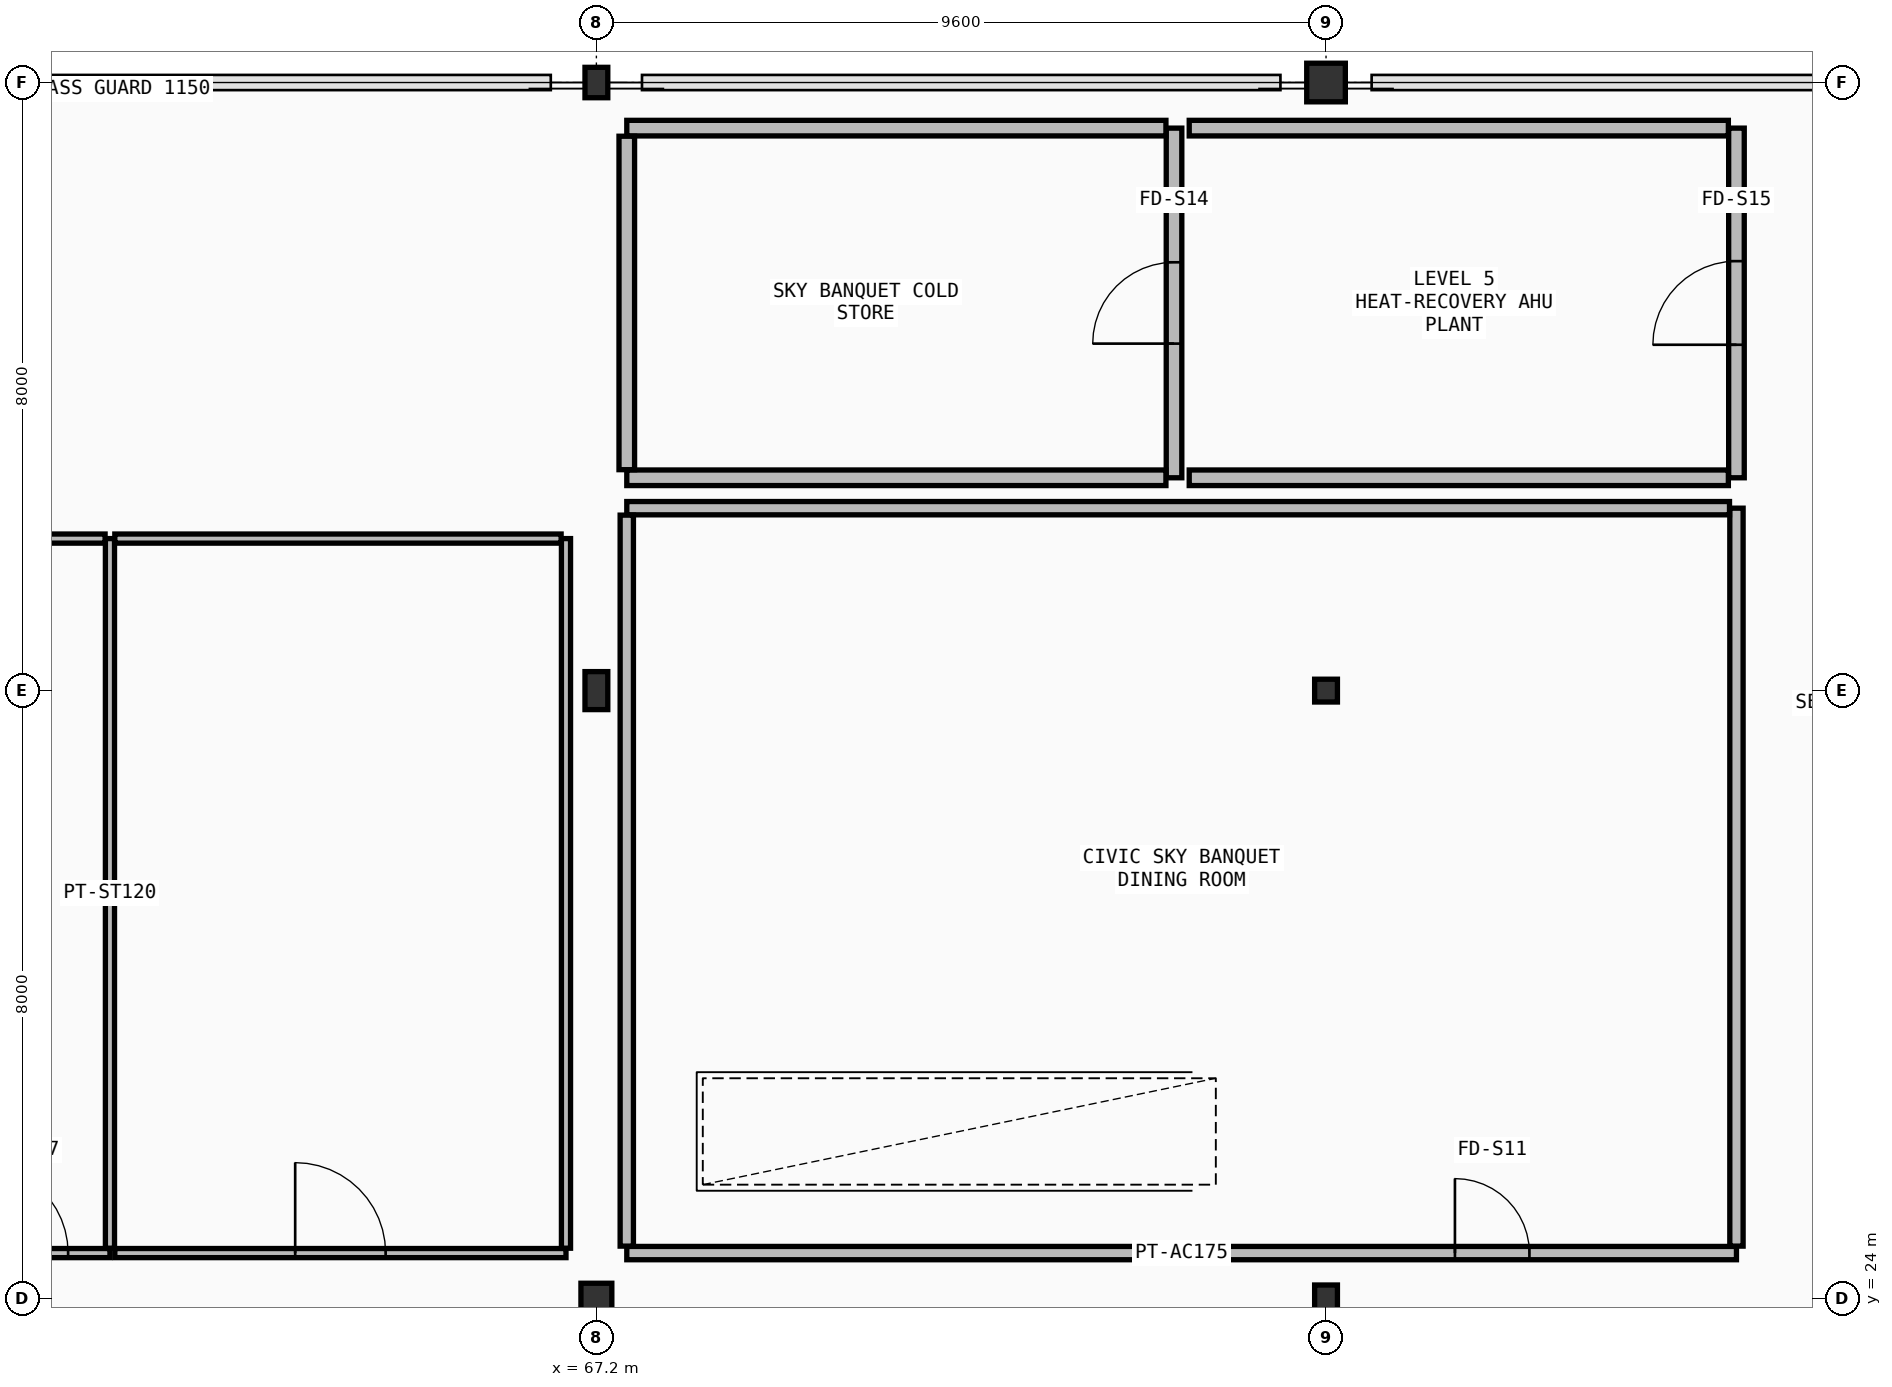
"""IFC4 building model, lengths in metres.
Left out: names, types, materials, properties, quantities, classifications, styles, units other than length and angle.
Written with IfcOpenShell. Run it as: python <this file> out.ifc"""

import sys

from ifc_helpers import new_model, si_unit, direction, frame, frame_2d, origin, origin_2d, place, context, subcontext, project, spatial, rectangle, hollow_circle, i_section, extrude, element, fill, save


model = new_model("IFC4")
c1 = context("Model", 3, precision=1e-05, world=origin(), true_north=direction((0.0, 1.0)))
c2 = subcontext(c1, "Body", "Model", "MODEL_VIEW")
j1 = project(units=[si_unit("LENGTHUNIT", "METRE"), si_unit("PLANEANGLEUNIT", "RADIAN")], contexts=[c1])
p1 = place(None, origin())
s1 = spatial("IfcSite", under=j1, at=p1, CompositionType="ELEMENT")
p2 = place(p1, origin())
s2 = spatial("IfcBuilding", under=s1, at=p2, CompositionType="ELEMENT")
p3 = place(p2, frame((0.0, 0.0, 24.9)))
s3 = spatial("IfcBuildingStorey", under=s2, at=p3, CompositionType="ELEMENT", Elevation=24.9)
p4 = place(p3, frame((67.2, 24.0, 0.0), z_axis=(0.0, 0.0, 1.0), x_axis=(1.0, 0.0, 0.0)))
e1 = element("IfcColumn", 1, at=p4, inside=s3, PredefinedType="COLUMN", context=c2, shape_type="SweptSolid", body=[
    extrude(hollow_circle(Radius=0.203, WallThickness=0.02, at=origin_2d()), origin(), (0.0, 0.0, 1.0), 4.5),
])
p5 = place(p3, frame((67.2, 32.0, 0.0), z_axis=(0.0, 0.0, 1.0), x_axis=(1.0, 0.0, 0.0)))
e2 = element("IfcColumn", 2, at=p5, inside=s3, PredefinedType="COLUMN", context=c2, shape_type="SweptSolid", body=[
    extrude(i_section(OverallWidth=0.3, OverallDepth=0.5, WebThickness=0.014, FlangeThickness=0.028, FilletRadius=0.027, at=origin_2d()), origin(), (0.0, 0.0, 1.0), 4.5),
])
p6 = place(p3, frame((67.2, 40.0, 0.0), z_axis=(0.0, 0.0, 1.0), x_axis=(1.0, 0.0, 0.0)))
e3 = element("IfcColumn", 3, at=p6, inside=s3, PredefinedType="COLUMN", context=c2, shape_type="SweptSolid", body=[
    extrude(i_section(OverallWidth=0.3, OverallDepth=0.4, WebThickness=0.013, FlangeThickness=0.024, FilletRadius=0.027, at=origin_2d()), origin(), (0.0, 0.0, 1.0), 4.5),
])
p7 = place(p3, frame((76.8, 24.0, 0.0), z_axis=(0.0, 0.0, 1.0), x_axis=(1.0, 0.0, 0.0)))
e4 = element("IfcColumn", 4, at=p7, inside=s3, PredefinedType="COLUMN", context=c2, shape_type="SweptSolid", body=[
    extrude(i_section(OverallWidth=0.3, OverallDepth=0.36, WebThickness=0.012, FlangeThickness=0.022, FilletRadius=0.027, at=origin_2d()), origin(), (0.0, 0.0, 1.0), 4.5),
])
p8 = place(p3, frame((76.8, 32.0, 0.0), z_axis=(0.0, 0.0, 1.0), x_axis=(1.0, 0.0, 0.0)))
e5 = element("IfcColumn", 5, at=p8, inside=s3, PredefinedType="COLUMN", context=c2, shape_type="SweptSolid", body=[
    extrude(i_section(OverallWidth=0.3, OverallDepth=0.3, WebThickness=0.011, FlangeThickness=0.019, FilletRadius=0.027, at=origin_2d()), origin(), (0.0, 0.0, 1.0), 4.5),
])
p9 = place(p3, frame((76.8, 40.0, 0.0), z_axis=(0.0, 0.0, 1.0), x_axis=(1.0, 0.0, 0.0)))
e6 = element("IfcColumn", 6, at=p9, inside=s3, PredefinedType="COLUMN", context=c2, shape_type="SweptSolid", body=[
    extrude(hollow_circle(Radius=0.254, WallThickness=0.025, at=origin_2d()), origin(), (0.0, 0.0, 1.0), 4.5),
])
p10 = place(p3, frame((67.6, 24.6, 0.0), z_axis=(0.0, 0.0, 1.0), x_axis=(1.0, 0.0, 0.0)))
e7 = element("IfcWall", 7, at=p10, inside=s3, PredefinedType="PARTITIONING", context=c2, shape_type="SweptSolid", body=[
    extrude(rectangle(XDim=14.6, YDim=0.175, at=frame_2d((7.3, 0.0))), origin(), (0.0, 0.0, 1.0), 3.34),
])
p11 = place(p10, frame((10.896, 0.0, 0.0)))
e8 = element("IfcOpeningElement", 8, at=p11, cuts=e7, PredefinedType="OPENING", context=c2, shape_type="SweptSolid", body=[
    extrude(rectangle(XDim=0.98, YDim=2.2, at=frame_2d((0.49, 1.1))), frame((0.0, 0.097, 0.0), z_axis=(0.0, -1.0, 0.0), x_axis=(1.0, 0.0, 0.0)), (0.0, 0.0, 1.0), 0.195),
])
p12 = place(p3, frame((82.2, 24.691, 0.0), z_axis=(0.0, 0.0, 1.0), x_axis=(0.0, 1.0, 0.0)))
e9 = element("IfcWall", 9, at=p12, inside=s3, PredefinedType="PARTITIONING", context=c2, shape_type="SweptSolid", body=[
    extrude(rectangle(XDim=9.708, YDim=0.175, at=frame_2d((4.854, 0.0))), origin(), (0.0, 0.0, 1.0), 3.74),
])
p13 = place(p3, frame((82.108, 34.4, 0.0), z_axis=(0.0, 0.0, 1.0), x_axis=(-1.0, 0.0, 0.0)))
e10 = element("IfcWall", 10, at=p13, inside=s3, PredefinedType="PARTITIONING", context=c2, shape_type="SweptSolid", body=[
    extrude(rectangle(XDim=14.508, YDim=0.175, at=frame_2d((7.254, 0.0))), origin(), (0.0, 0.0, 1.0), 3.53),
])
p14 = place(p3, frame((67.6, 34.309, 0.0), z_axis=(0.0, 0.0, 1.0), x_axis=(0.0, -1.0, 0.0)))
e11 = element("IfcWall", 11, at=p14, inside=s3, PredefinedType="PARTITIONING", context=c2, shape_type="SweptSolid", body=[
    extrude(rectangle(XDim=9.617, YDim=0.175, at=frame_2d((4.809, 0.0))), origin(), (0.0, 0.0, 1.0), 3.64),
])
p15 = place(p3, frame((74.8, 34.8, 0.0), z_axis=(0.0, 0.0, 1.0), x_axis=(0.0, 1.0, 0.0)))
e12 = element("IfcWall", 12, at=p15, inside=s3, PredefinedType="SOLIDWALL", context=c2, shape_type="SweptSolid", body=[
    extrude(rectangle(XDim=4.6, YDim=0.205, at=frame_2d((2.3, 0.0))), origin(), (0.0, 0.0, 1.0), 4.26),
])
p16 = place(p15, frame((1.765, 0.0, 0.0)))
e13 = element("IfcOpeningElement", 13, at=p16, cuts=e12, PredefinedType="OPENING", context=c2, shape_type="SweptSolid", body=[
    extrude(rectangle(XDim=1.07, YDim=2.26, at=frame_2d((0.535, 1.13))), frame((0.0, 0.113, 0.0), z_axis=(0.0, -1.0, 0.0), x_axis=(1.0, 0.0, 0.0)), (0.0, 0.0, 1.0), 0.225),
])
for number, where, z_axis, x_axis in (
    (14, (67.6, 34.8, 0.0), (0.0, 0.0, 1.0), (1.0, 0.0, 0.0)),
    (15, (74.694, 39.4, 0.0), (0.0, 0.0, 1.0), (-1.0, 0.0, 0.0)),
):
    element("IfcWall", number, at=place(p3, frame(where, z_axis=z_axis, x_axis=x_axis)), inside=s3, PredefinedType="SOLIDWALL", context=c2, shape_type="SweptSolid", body=[
        extrude(rectangle(XDim=7.094, YDim=0.205, at=frame_2d((3.547, 0.0))), origin(), (0.0, 0.0, 1.0), 4.26),
    ])
p17 = place(p3, frame((67.6, 39.293, 0.0), z_axis=(0.0, 0.0, 1.0), x_axis=(0.0, -1.0, 0.0)))
e16 = element("IfcWall", 16, at=p17, inside=s3, PredefinedType="SOLIDWALL", context=c2, shape_type="SweptSolid", body=[
    extrude(rectangle(XDim=4.387, YDim=0.205, at=frame_2d((2.193, 0.0))), origin(), (0.0, 0.0, 1.0), 4.26),
])
p18 = place(p3, frame((82.2, 34.8, 0.0), z_axis=(0.0, 0.0, 1.0), x_axis=(0.0, 1.0, 0.0)))
e17 = element("IfcWall", 17, at=p18, inside=s3, PredefinedType="SOLIDWALL", context=c2, shape_type="SweptSolid", body=[
    extrude(rectangle(XDim=4.6, YDim=0.205, at=frame_2d((2.3, 0.0))), origin(), (0.0, 0.0, 1.0), 4.26),
])
p19 = place(p18, frame((1.75, 0.0, 0.0)))
e18 = element("IfcOpeningElement", 18, at=p19, cuts=e17, PredefinedType="OPENING", context=c2, shape_type="SweptSolid", body=[
    extrude(rectangle(XDim=1.1, YDim=2.28, at=frame_2d((0.55, 1.14))), frame((0.0, 0.113, 0.0), z_axis=(0.0, -1.0, 0.0), x_axis=(1.0, 0.0, 0.0)), (0.0, 0.0, 1.0), 0.225),
])
for number, where, z_axis, x_axis in (
    (19, (75.0, 34.8, 0.0), (0.0, 0.0, 1.0), (1.0, 0.0, 0.0)),
    (20, (82.094, 39.4, 0.0), (0.0, 0.0, 1.0), (-1.0, 0.0, 0.0)),
):
    element("IfcWall", number, at=place(p3, frame(where, z_axis=z_axis, x_axis=x_axis)), inside=s3, PredefinedType="SOLIDWALL", context=c2, shape_type="SweptSolid", body=[
        extrude(rectangle(XDim=7.094, YDim=0.205, at=frame_2d((3.547, 0.0))), origin(), (0.0, 0.0, 1.0), 3.53),
    ])
p20 = place(p3, frame((54.546, 24.6, 0.0), z_axis=(0.0, 0.0, 1.0), x_axis=(1.0, 0.0, 0.0)))
e21 = element("IfcWall", 21, at=p20, inside=s3, PredefinedType="PARTITIONING", context=c2, shape_type="SweptSolid", body=[
    extrude(rectangle(XDim=6.254, YDim=0.12, at=frame_2d((3.127, 0.0))), origin(), (0.0, 0.0, 1.0), 3.64),
])
p21 = place(p20, frame((4.543, 0.0, 0.0)))
e22 = element("IfcOpeningElement", 22, at=p21, cuts=e21, PredefinedType="OPENING", context=c2, shape_type="SweptSolid", body=[
    extrude(rectangle(XDim=1.16, YDim=2.32, at=frame_2d((0.58, 1.16))), frame((0.0, 0.07, 0.0), z_axis=(0.0, -1.0, 0.0), x_axis=(1.0, 0.0, 0.0)), (0.0, 0.0, 1.0), 0.14),
])
p22 = place(p3, frame((60.8, 24.664, 0.0), z_axis=(0.0, 0.0, 1.0), x_axis=(0.0, 1.0, 0.0)))
e23 = element("IfcWall", 23, at=p22, inside=s3, PredefinedType="PARTITIONING", context=c2, shape_type="SweptSolid", body=[
    extrude(rectangle(XDim=9.336, YDim=0.12, at=frame_2d((4.668, 0.0))), origin(), (0.0, 0.0, 1.0), 3.78),
])
p23 = place(p3, frame((60.736, 34.0, 0.0), z_axis=(0.0, 0.0, 1.0), x_axis=(-1.0, 0.0, 0.0)))
e24 = element("IfcWall", 24, at=p23, inside=s3, PredefinedType="PARTITIONING", context=c2, shape_type="SweptSolid", body=[
    extrude(rectangle(XDim=6.19, YDim=0.12, at=frame_2d((3.095, 0.0))), origin(), (0.0, 0.0, 1.0), 3.68),
])
p24 = place(p3, frame((60.864, 24.6, 0.0), z_axis=(0.0, 0.0, 1.0), x_axis=(1.0, 0.0, 0.0)))
e25 = element("IfcWall", 25, at=p24, inside=s3, PredefinedType="PARTITIONING", context=c2, shape_type="SweptSolid", body=[
    extrude(rectangle(XDim=5.936, YDim=0.12, at=frame_2d((2.968, 0.0))), origin(), (0.0, 0.0, 1.0), 4.27),
])
p25 = place(p24, frame((2.373, 0.0, 0.0)))
e26 = element("IfcOpeningElement", 26, at=p25, cuts=e25, PredefinedType="OPENING", context=c2, shape_type="SweptSolid", body=[
    extrude(rectangle(XDim=1.19, YDim=2.34, at=frame_2d((0.595, 1.17))), frame((0.0, 0.07, 0.0), z_axis=(0.0, -1.0, 0.0), x_axis=(1.0, 0.0, 0.0)), (0.0, 0.0, 1.0), 0.14),
])
p26 = place(p3, frame((66.8, 24.664, 0.0), z_axis=(0.0, 0.0, 1.0), x_axis=(0.0, 1.0, 0.0)))
e27 = element("IfcWall", 27, at=p26, inside=s3, PredefinedType="PARTITIONING", context=c2, shape_type="SweptSolid", body=[
    extrude(rectangle(XDim=9.336, YDim=0.12, at=frame_2d((4.668, 0.0))), origin(), (0.0, 0.0, 1.0), 3.78),
])
p27 = place(p3, frame((66.736, 34.0, 0.0), z_axis=(0.0, 0.0, 1.0), x_axis=(-1.0, 0.0, 0.0)))
e28 = element("IfcWall", 28, at=p27, inside=s3, PredefinedType="PARTITIONING", context=c2, shape_type="SweptSolid", body=[
    extrude(rectangle(XDim=5.872, YDim=0.12, at=frame_2d((2.936, 0.0))), origin(), (0.0, 0.0, 1.0), 4.26),
])
p28 = place(p11, origin())
e29 = element("IfcDoor", 29, at=p28, inside=s3, OperationType="SINGLE_SWING_RIGHT", PredefinedType="DOOR", context=c2, shape_type="SweptSolid", body=[
    extrude(rectangle(XDim=0.98, YDim=2.2, at=frame_2d((0.49, 1.1))), frame((0.0, 0.025, 0.0), z_axis=(0.0, -1.0, 0.0), x_axis=(1.0, 0.0, 0.0)), (0.0, 0.0, 1.0), 0.05),
])
fill(e8, e29)
p29 = place(p16, origin())
e30 = element("IfcDoor", 30, at=p29, inside=s3, OperationType="SINGLE_SWING_LEFT", PredefinedType="DOOR", context=c2, shape_type="SweptSolid", body=[
    extrude(rectangle(XDim=1.07, YDim=2.26, at=frame_2d((0.535, 1.13))), frame((0.0, 0.025, 0.0), z_axis=(0.0, -1.0, 0.0), x_axis=(1.0, 0.0, 0.0)), (0.0, 0.0, 1.0), 0.05),
])
fill(e13, e30)
p30 = place(p19, origin())
e31 = element("IfcDoor", 31, at=p30, inside=s3, OperationType="SINGLE_SWING_RIGHT", PredefinedType="DOOR", context=c2, shape_type="SweptSolid", body=[
    extrude(rectangle(XDim=1.1, YDim=2.28, at=frame_2d((0.55, 1.14))), frame((0.0, 0.025, 0.0), z_axis=(0.0, -1.0, 0.0), x_axis=(1.0, 0.0, 0.0)), (0.0, 0.0, 1.0), 0.05),
])
fill(e18, e31)
p31 = place(p21, origin())
e32 = element("IfcDoor", 32, at=p31, inside=s3, OperationType="SINGLE_SWING_RIGHT", PredefinedType="DOOR", context=c2, shape_type="SweptSolid", body=[
    extrude(rectangle(XDim=1.16, YDim=2.32, at=frame_2d((0.58, 1.16))), frame((0.0, 0.025, 0.0), z_axis=(0.0, -1.0, 0.0), x_axis=(1.0, 0.0, 0.0)), (0.0, 0.0, 1.0), 0.05),
])
fill(e22, e32)
p32 = place(p25, origin())
e33 = element("IfcDoor", 33, at=p32, inside=s3, OperationType="SINGLE_SWING_LEFT", PredefinedType="DOOR", context=c2, shape_type="SweptSolid", body=[
    extrude(rectangle(XDim=1.19, YDim=2.34, at=frame_2d((0.595, 1.17))), frame((0.0, 0.025, 0.0), z_axis=(0.0, -1.0, 0.0), x_axis=(1.0, 0.0, 0.0)), (0.0, 0.0, 1.0), 0.05),
])
fill(e26, e33)
save(model, sys.argv[1])
